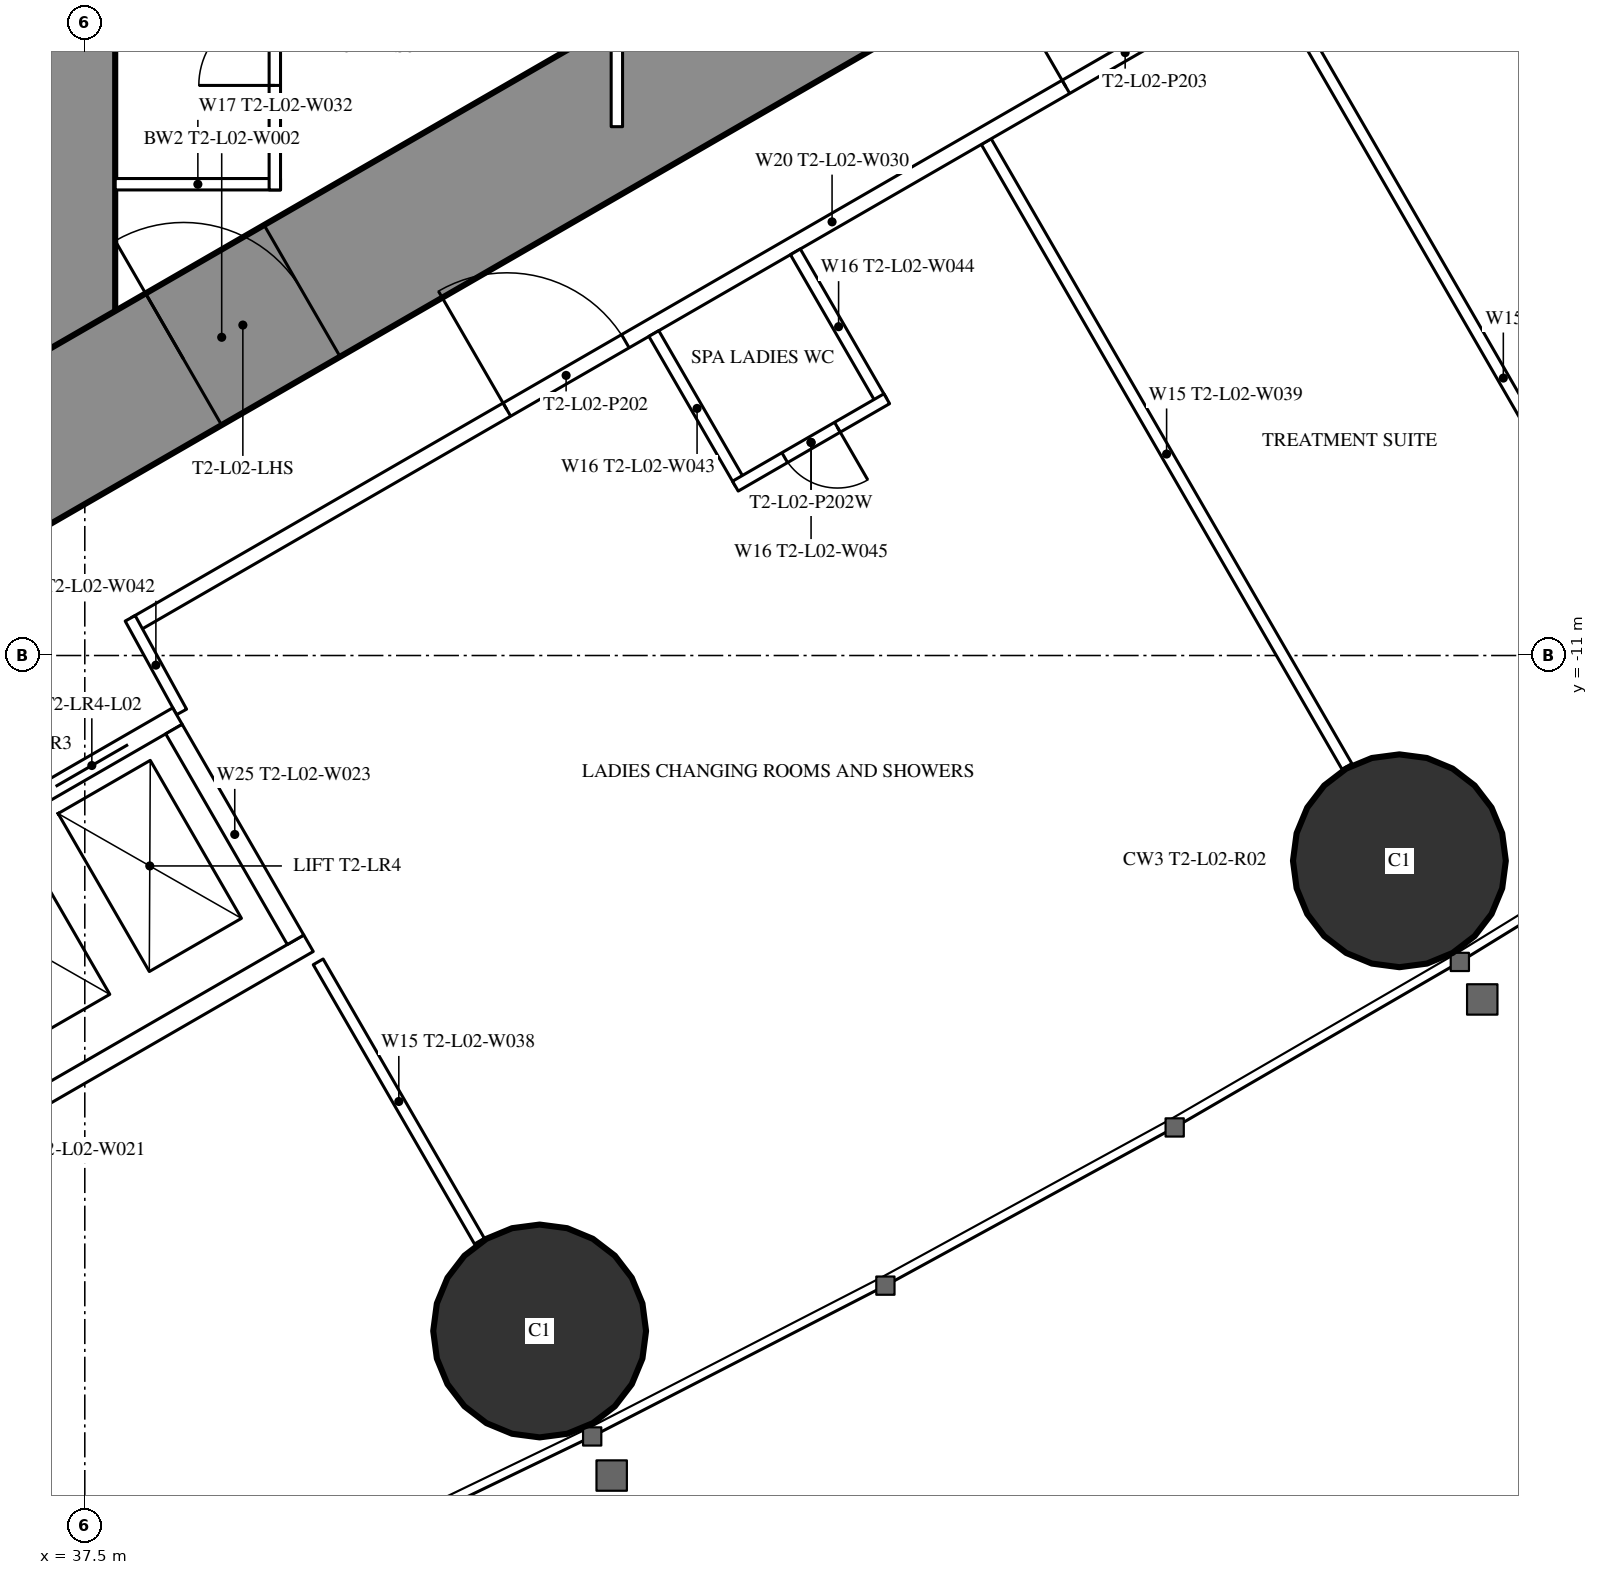
"""IFC4 building model, lengths in metres.
Left out: names, types, materials, properties, quantities, classifications, styles, units other than length and angle.
Written with IfcOpenShell. Run it as: python <this file> out.ifc"""

import sys

from ifc_helpers import new_model, si_unit, direction, frame, frame_2d, origin, origin_2d, place, context, subcontext, project, spatial, rectangle, hollow_circle, extrude, element, fill, save


model = new_model("IFC4")
c1 = context("Model", 3, precision=1e-05, world=origin(), true_north=direction((0.0, 1.0)))
c2 = subcontext(c1, "Body", "Model", "MODEL_VIEW")
j1 = project(units=[si_unit("LENGTHUNIT", "METRE"), si_unit("PLANEANGLEUNIT", "RADIAN")], contexts=[c1])
p1 = place(None, origin())
s1 = spatial("IfcSite", under=j1, at=p1, CompositionType="ELEMENT")
p2 = place(p1, origin())
s2 = spatial("IfcBuilding", under=s1, at=p2, CompositionType="ELEMENT")
p3 = place(p2, frame((0.0, 0.0, 12.6)))
s3 = spatial("IfcBuildingStorey", under=s2, at=p3, CompositionType="ELEMENT", Elevation=12.6)
for number, where, z_axis, x_axis in (
    (1, (43.484, -19.886, 0.0), (0.0, 0.0, 1.0), (1.0, 0.0, 0.0)),
    (2, (54.795, -13.701, 0.0), (0.0, 0.0, 1.0), (1.0, 0.0, 0.0)),
):
    element("IfcColumn", number, at=place(p3, frame(where, z_axis=z_axis, x_axis=x_axis)), inside=s3, PredefinedType="COLUMN", context=c2, shape_type="SweptSolid", body=[
        extrude(hollow_circle(Radius=1.4, WallThickness=0.12, at=origin_2d()), origin(), (0.0, 0.0, 1.0), 5.4),
    ])
p4 = place(p3, frame((37.3, -8.6, 0.0), z_axis=(0.0, 0.0, 1.0), x_axis=(0.0, 1.0, 0.0)))
e3 = element("IfcWall", 3, at=p4, inside=s3, PredefinedType="SHEAR", context=c2, shape_type="SweptSolid", body=[
    extrude(rectangle(XDim=17.2, YDim=1.2, at=frame_2d((8.6, 0.0))), origin(), (0.0, 0.0, 1.0), 5.4),
])
p5 = place(p4, frame((7.7, 0.0, 0.0)))
e4 = element("IfcOpeningElement", 4, at=p5, cuts=e3, PredefinedType="OPENING", context=c2, shape_type="SweptSolid", body=[
    extrude(rectangle(XDim=1.8, YDim=2.2, at=frame_2d((0.9, 1.1))), frame((0.0, 0.61, 0.0), z_axis=(0.0, -1.0, 0.0), x_axis=(1.0, 0.0, 0.0)), (0.0, 0.0, 1.0), 1.22),
])
p6 = place(p3, frame((27.2, -13.8, 0.0), z_axis=(0.0, 0.0, 1.0), x_axis=(0.866027159892, 0.499996958321, 0.0)))
e5 = element("IfcWall", 5, at=p6, inside=s3, PredefinedType="SHEAR", context=c2, shape_type="SweptSolid", body=[
    extrude(rectangle(XDim=27.947, YDim=2.0, at=frame_2d((13.973, 0.0))), origin(), (0.0, 0.0, 1.0), 5.4),
])
p7 = place(p6, frame((4.6, 0.0, 0.0)))
e6 = element("IfcOpeningElement", 6, at=p7, cuts=e5, PredefinedType="OPENING", context=c2, shape_type="SweptSolid", body=[
    extrude(rectangle(XDim=1.0, YDim=2.2, at=frame_2d((0.5, 1.1))), frame((0.0, 1.01, 0.0), z_axis=(0.0, -1.0, 0.0), x_axis=(1.0, 0.0, 0.0)), (0.0, 0.0, 1.0), 2.02),
])
p8 = place(p6, frame((13.395, 0.0, 0.0)))
e7 = element("IfcOpeningElement", 7, at=p8, cuts=e5, PredefinedType="OPENING", context=c2, shape_type="SweptSolid", body=[
    extrude(rectangle(XDim=1.8, YDim=2.2, at=frame_2d((0.9, 1.1))), frame((0.0, 1.01, 0.0), z_axis=(0.0, -1.0, 0.0), x_axis=(1.0, 0.0, 0.0)), (0.0, 0.0, 1.0), 2.02),
])
p9 = place(p3, frame((49.36, -4.239, 0.0), z_axis=(0.0, 0.0, 1.0), x_axis=(0.499984446848, -0.866034383215, 0.0)))
e8 = element("IfcWall", 8, at=p9, inside=s3, PredefinedType="PARTITIONING", context=c2, shape_type="SweptSolid", body=[
    extrude(rectangle(XDim=9.491, YDim=0.15, at=frame_2d((4.746, 0.0))), origin(), (0.0, 0.0, 1.0), 4.15),
])
p10 = place(p3, frame((53.115, -2.071, 0.0), z_axis=(0.0, 0.0, 1.0), x_axis=(0.500000975677, -0.866024840476, 0.0)))
e9 = element("IfcWall", 9, at=p10, inside=s3, PredefinedType="PARTITIONING", context=c2, shape_type="SweptSolid", body=[
    extrude(rectangle(XDim=12.191, YDim=0.15, at=frame_2d((6.095, 0.0))), origin(), (0.0, 0.0, 1.0), 5.15),
])
p11 = place(p3, frame((40.57, -15.03, 0.0), z_axis=(0.0, 0.0, 1.0), x_axis=(0.500012993597, -0.866017901798, 0.0)))
e10 = element("IfcWall", 10, at=p11, inside=s3, PredefinedType="PARTITIONING", context=c2, shape_type="SweptSolid", body=[
    extrude(rectangle(XDim=4.243, YDim=0.15, at=frame_2d((2.122, 0.0))), origin(), (0.0, 0.0, 1.0), 5.15),
])
p12 = place(p3, frame((38.16, -10.59, 0.0), z_axis=(0.0, 0.0, 1.0), x_axis=(0.866027029586, 0.499997184019, 0.0)))
e11 = element("IfcWall", 11, at=p12, inside=s3, PredefinedType="PARTITIONING", context=c2, shape_type="SweptSolid", body=[
    extrude(rectangle(XDim=21.18, YDim=0.2, at=frame_2d((10.59, 0.0))), origin(), (0.0, 0.0, 1.0), 4.25),
])
p13 = place(p12, frame((14.142, 0.0, 0.0)))
e12 = element("IfcOpeningElement", 12, at=p13, cuts=e11, PredefinedType="OPENING", context=c2, shape_type="SweptSolid", body=[
    extrude(rectangle(XDim=1.8, YDim=2.2, at=frame_2d((0.9, 1.1))), frame((0.0, 0.11, 0.0), z_axis=(0.0, -1.0, 0.0), x_axis=(1.0, 0.0, 0.0)), (0.0, 0.0, 1.0), 0.22),
])
p14 = place(p12, frame((18.183, 0.0, 0.0)))
e13 = element("IfcOpeningElement", 13, at=p14, cuts=e11, PredefinedType="OPENING", context=c2, shape_type="SweptSolid", body=[
    extrude(rectangle(XDim=1.8, YDim=2.2, at=frame_2d((0.9, 1.1))), frame((0.0, 0.11, 0.0), z_axis=(0.0, -1.0, 0.0), x_axis=(1.0, 0.0, 0.0)), (0.0, 0.0, 1.0), 0.22),
])
p15 = place(p12, frame((5.65, 0.0, 0.0)))
e14 = element("IfcOpeningElement", 14, at=p15, cuts=e11, PredefinedType="OPENING", context=c2, shape_type="SweptSolid", body=[
    extrude(rectangle(XDim=1.8, YDim=2.2, at=frame_2d((0.9, 1.1))), frame((0.0, 0.11, 0.0), z_axis=(0.0, -1.0, 0.0), x_axis=(1.0, 0.0, 0.0)), (0.0, 0.0, 1.0), 0.22),
])
p16 = place(p3, frame((38.773, -11.742, 0.0), z_axis=(0.0, 0.0, 1.0), x_axis=(-0.481418475768, 0.876490873421, 0.0)))
e15 = element("IfcWall", 15, at=p16, inside=s3, PredefinedType="PARTITIONING", context=c2, shape_type="SweptSolid", body=[
    extrude(rectangle(XDim=1.405, YDim=0.15, at=frame_2d((0.703, 0.0))), origin(), (0.0, 0.0, 1.0), 5.15),
])
p17 = place(p3, frame((37.9, -4.8, 0.0), z_axis=(0.0, 0.0, 1.0), x_axis=(1.0, 0.0, 0.0)))
e16 = element("IfcWall", 16, at=p17, inside=s3, PredefinedType="PARTITIONING", context=c2, shape_type="SweptSolid", body=[
    extrude(rectangle(XDim=2.175, YDim=0.15, at=frame_2d((1.087, 0.0))), origin(), (0.0, 0.0, 1.0), 5.15),
])
p18 = place(p3, frame((40.0, -4.875, 0.0), z_axis=(0.0, 0.0, 1.0), x_axis=(0.0, 1.0, 0.0)))
e17 = element("IfcWall", 17, at=p18, inside=s3, PredefinedType="PARTITIONING", context=c2, shape_type="SweptSolid", body=[
    extrude(rectangle(XDim=3.75, YDim=0.15, at=frame_2d((1.875, 0.0))), origin(), (0.0, 0.0, 1.0), 5.15),
])
p19 = place(p18, frame((1.375, 0.0, 0.0)))
e18 = element("IfcOpeningElement", 18, at=p19, cuts=e17, PredefinedType="OPENING", context=c2, shape_type="SweptSolid", body=[
    extrude(rectangle(XDim=1.0, YDim=2.2, at=frame_2d((0.5, 1.1))), frame((0.0, 0.085, 0.0), z_axis=(0.0, -1.0, 0.0), x_axis=(1.0, 0.0, 0.0)), (0.0, 0.0, 1.0), 0.17),
])
p20 = place(p3, frame((44.5, -4.043, 0.0), z_axis=(0.0, 0.0, 1.0), x_axis=(0.0, 1.0, 0.0)))
e19 = element("IfcWall", 19, at=p20, inside=s3, PredefinedType="PARTITIONING", context=c2, shape_type="SweptSolid", body=[
    extrude(rectangle(XDim=8.085, YDim=0.15, at=frame_2d((4.043, 0.0))), origin(), (0.0, 0.0, 1.0), 4.25),
])
p21 = place(p20, frame((1.521, 0.0, 0.0)))
e20 = element("IfcOpeningElement", 20, at=p21, cuts=e19, PredefinedType="OPENING", context=c2, shape_type="SweptSolid", body=[
    extrude(rectangle(XDim=1.0, YDim=2.2, at=frame_2d((0.5, 1.1))), frame((0.0, 0.085, 0.0), z_axis=(0.0, -1.0, 0.0), x_axis=(1.0, 0.0, 0.0)), (0.0, 0.0, 1.0), 0.17),
])
p22 = place(p20, frame((5.564, 0.0, 0.0)))
e21 = element("IfcOpeningElement", 21, at=p22, cuts=e19, PredefinedType="OPENING", context=c2, shape_type="SweptSolid", body=[
    extrude(rectangle(XDim=1.0, YDim=2.2, at=frame_2d((0.5, 1.1))), frame((0.0, 0.085, 0.0), z_axis=(0.0, -1.0, 0.0), x_axis=(1.0, 0.0, 0.0)), (0.0, 0.0, 1.0), 0.17),
])
for number, where, z_axis, x_axis in (
    (22, (44.986, -6.764, 0.0), (0.0, 0.0, 1.0), (0.5, -0.866, 0.0)),
    (23, (46.848, -5.689, 0.0), (0.0, 0.0, 1.0), (0.5, -0.866, 0.0)),
):
    element("IfcWall", number, at=place(p3, frame(where, z_axis=z_axis, x_axis=x_axis)), inside=s3, PredefinedType="PARTITIONING", context=c2, shape_type="SweptSolid", body=[
        extrude(rectangle(XDim=2.275, YDim=0.15, at=frame_2d((1.137, 0.0))), origin(), (0.0, 0.0, 1.0), 5.15),
    ])
p23 = place(p3, frame((46.059, -8.772, 0.0), z_axis=(0.0, 0.0, 1.0), x_axis=(0.866007057882, 0.500031774688, 0.0)))
e24 = element("IfcWall", 24, at=p23, inside=s3, PredefinedType="PARTITIONING", context=c2, shape_type="SweptSolid", body=[
    extrude(rectangle(XDim=2.3, YDim=0.15, at=frame_2d((1.15, 0.0))), origin(), (0.0, 0.0, 1.0), 5.15),
])
p24 = place(p23, frame((0.75, 0.0, 0.0)))
e25 = element("IfcOpeningElement", 25, at=p24, cuts=e24, PredefinedType="OPENING", context=c2, shape_type="SweptSolid", body=[
    extrude(rectangle(XDim=0.8, YDim=2.2, at=frame_2d((0.4, 1.1))), frame((0.0, 0.085, 0.0), z_axis=(0.0, -1.0, 0.0), x_axis=(1.0, 0.0, 0.0)), (0.0, 0.0, 1.0), 0.17),
])
p25 = place(p3, frame((31.271, -16.097, 0.0), z_axis=(0.0, 0.0, 1.0), x_axis=(0.86604045752, 0.499973925258, 0.0)))
e26 = element("IfcWall", 26, at=p25, inside=s3, PredefinedType="PARTITIONING", context=c2, shape_type="SweptSolid", body=[
    extrude(rectangle(XDim=8.6, YDim=0.25, at=frame_2d((4.3, 0.0))), origin(), (0.0, 0.0, 1.0), 5.15),
])
p26 = place(p25, frame((0.75, 0.0, 0.0)))
e27 = element("IfcOpeningElement", 27, at=p26, cuts=e26, PredefinedType="OPENING", context=c2, shape_type="SweptSolid", body=[
    extrude(rectangle(XDim=1.1, YDim=2.2, at=frame_2d((0.55, 1.1))), frame((0.0, 0.135, 0.0), z_axis=(0.0, -1.0, 0.0), x_axis=(1.0, 0.0, 0.0)), (0.0, 0.0, 1.0), 0.27),
])
p27 = place(p25, frame((2.75, 0.0, 0.0)))
e28 = element("IfcOpeningElement", 28, at=p27, cuts=e26, PredefinedType="OPENING", context=c2, shape_type="SweptSolid", body=[
    extrude(rectangle(XDim=1.1, YDim=2.2, at=frame_2d((0.55, 1.1))), frame((0.0, 0.135, 0.0), z_axis=(0.0, -1.0, 0.0), x_axis=(1.0, 0.0, 0.0)), (0.0, 0.0, 1.0), 0.27),
])
p28 = place(p25, frame((4.75, 0.0, 0.0)))
e29 = element("IfcOpeningElement", 29, at=p28, cuts=e26, PredefinedType="OPENING", context=c2, shape_type="SweptSolid", body=[
    extrude(rectangle(XDim=1.1, YDim=2.2, at=frame_2d((0.55, 1.1))), frame((0.0, 0.135, 0.0), z_axis=(0.0, -1.0, 0.0), x_axis=(1.0, 0.0, 0.0)), (0.0, 0.0, 1.0), 0.27),
])
p29 = place(p25, frame((6.75, 0.0, 0.0)))
e30 = element("IfcOpeningElement", 30, at=p29, cuts=e26, PredefinedType="OPENING", context=c2, shape_type="SweptSolid", body=[
    extrude(rectangle(XDim=1.1, YDim=2.2, at=frame_2d((0.55, 1.1))), frame((0.0, 0.135, 0.0), z_axis=(0.0, -1.0, 0.0), x_axis=(1.0, 0.0, 0.0)), (0.0, 0.0, 1.0), 0.27),
])
p30 = place(p3, frame((32.996, -19.086, 0.0), z_axis=(0.0, 0.0, 1.0), x_axis=(0.866028165386, 0.499995216735, 0.0)))
e31 = element("IfcWall", 31, at=p30, inside=s3, PredefinedType="PARTITIONING", context=c2, shape_type="SweptSolid", body=[
    extrude(rectangle(XDim=8.6, YDim=0.25, at=frame_2d((4.3, 0.0))), origin(), (0.0, 0.0, 1.0), 5.15),
])
p31 = place(p3, frame((38.673, -11.968, 0.0), z_axis=(0.0, 0.0, 1.0), x_axis=(0.499929347863, -0.866066190972, 0.0)))
e32 = element("IfcWall", 32, at=p31, inside=s3, PredefinedType="PARTITIONING", context=c2, shape_type="SweptSolid", body=[
    extrude(rectangle(XDim=3.201, YDim=0.25, at=frame_2d((1.6, 0.0))), origin(), (0.0, 0.0, 1.0), 5.15),
])
p32 = place(p13, origin())
e33 = element("IfcDoor", 33, at=p32, inside=s3, OperationType="DOUBLE_DOOR_SINGLE_SWING", PredefinedType="DOOR", context=c2, shape_type="SweptSolid", body=[
    extrude(rectangle(XDim=1.8, YDim=2.2, at=frame_2d((0.9, 1.1))), frame((0.0, 0.025, 0.0), z_axis=(0.0, -1.0, 0.0), x_axis=(1.0, 0.0, 0.0)), (0.0, 0.0, 1.0), 0.05),
])
fill(e12, e33)
p33 = place(p15, origin())
e34 = element("IfcDoor", 34, at=p33, inside=s3, OperationType="DOUBLE_DOOR_SINGLE_SWING", PredefinedType="DOOR", context=c2, shape_type="SweptSolid", body=[
    extrude(rectangle(XDim=1.8, YDim=2.2, at=frame_2d((0.9, 1.1))), frame((0.0, 0.025, 0.0), z_axis=(0.0, -1.0, 0.0), x_axis=(1.0, 0.0, 0.0)), (0.0, 0.0, 1.0), 0.05),
])
fill(e14, e34)
p34 = place(p19, origin())
e35 = element("IfcDoor", 35, at=p34, inside=s3, OperationType="SINGLE_SWING_LEFT", PredefinedType="DOOR", context=c2, shape_type="SweptSolid", body=[
    extrude(rectangle(XDim=1.0, YDim=2.2, at=frame_2d((0.5, 1.1))), frame((0.0, 0.025, 0.0), z_axis=(0.0, -1.0, 0.0), x_axis=(1.0, 0.0, 0.0)), (0.0, 0.0, 1.0), 0.05),
])
fill(e18, e35)
p35 = place(p8, origin())
e36 = element("IfcDoor", 36, at=p35, inside=s3, OperationType="DOUBLE_DOOR_SINGLE_SWING", PredefinedType="DOOR", context=c2, shape_type="SweptSolid", body=[
    extrude(rectangle(XDim=1.8, YDim=2.2, at=frame_2d((0.9, 1.1))), frame((0.0, 0.025, 0.0), z_axis=(0.0, -1.0, 0.0), x_axis=(1.0, 0.0, 0.0)), (0.0, 0.0, 1.0), 0.05),
])
fill(e7, e36)
p36 = place(p24, origin())
e37 = element("IfcDoor", 37, at=p36, inside=s3, OperationType="SINGLE_SWING_RIGHT", PredefinedType="DOOR", context=c2, shape_type="SweptSolid", body=[
    extrude(rectangle(XDim=0.8, YDim=2.2, at=frame_2d((0.4, 1.1))), frame((0.0, 0.025, 0.0), z_axis=(0.0, -1.0, 0.0), x_axis=(1.0, 0.0, 0.0)), (0.0, 0.0, 1.0), 0.05),
])
fill(e25, e37)
p37 = place(p29, origin())
e38 = element("IfcDoor", 38, at=p37, inside=s3, OperationType="DOUBLE_DOOR_SLIDING", PredefinedType="USERDEFINED", context=c2, shape_type="SweptSolid", body=[
    extrude(rectangle(XDim=1.1, YDim=2.2, at=frame_2d((0.55, 1.1))), frame((0.0, 0.025, 0.0), z_axis=(0.0, -1.0, 0.0), x_axis=(1.0, 0.0, 0.0)), (0.0, 0.0, 1.0), 0.05),
])
fill(e30, e38)
save(model, sys.argv[1])
